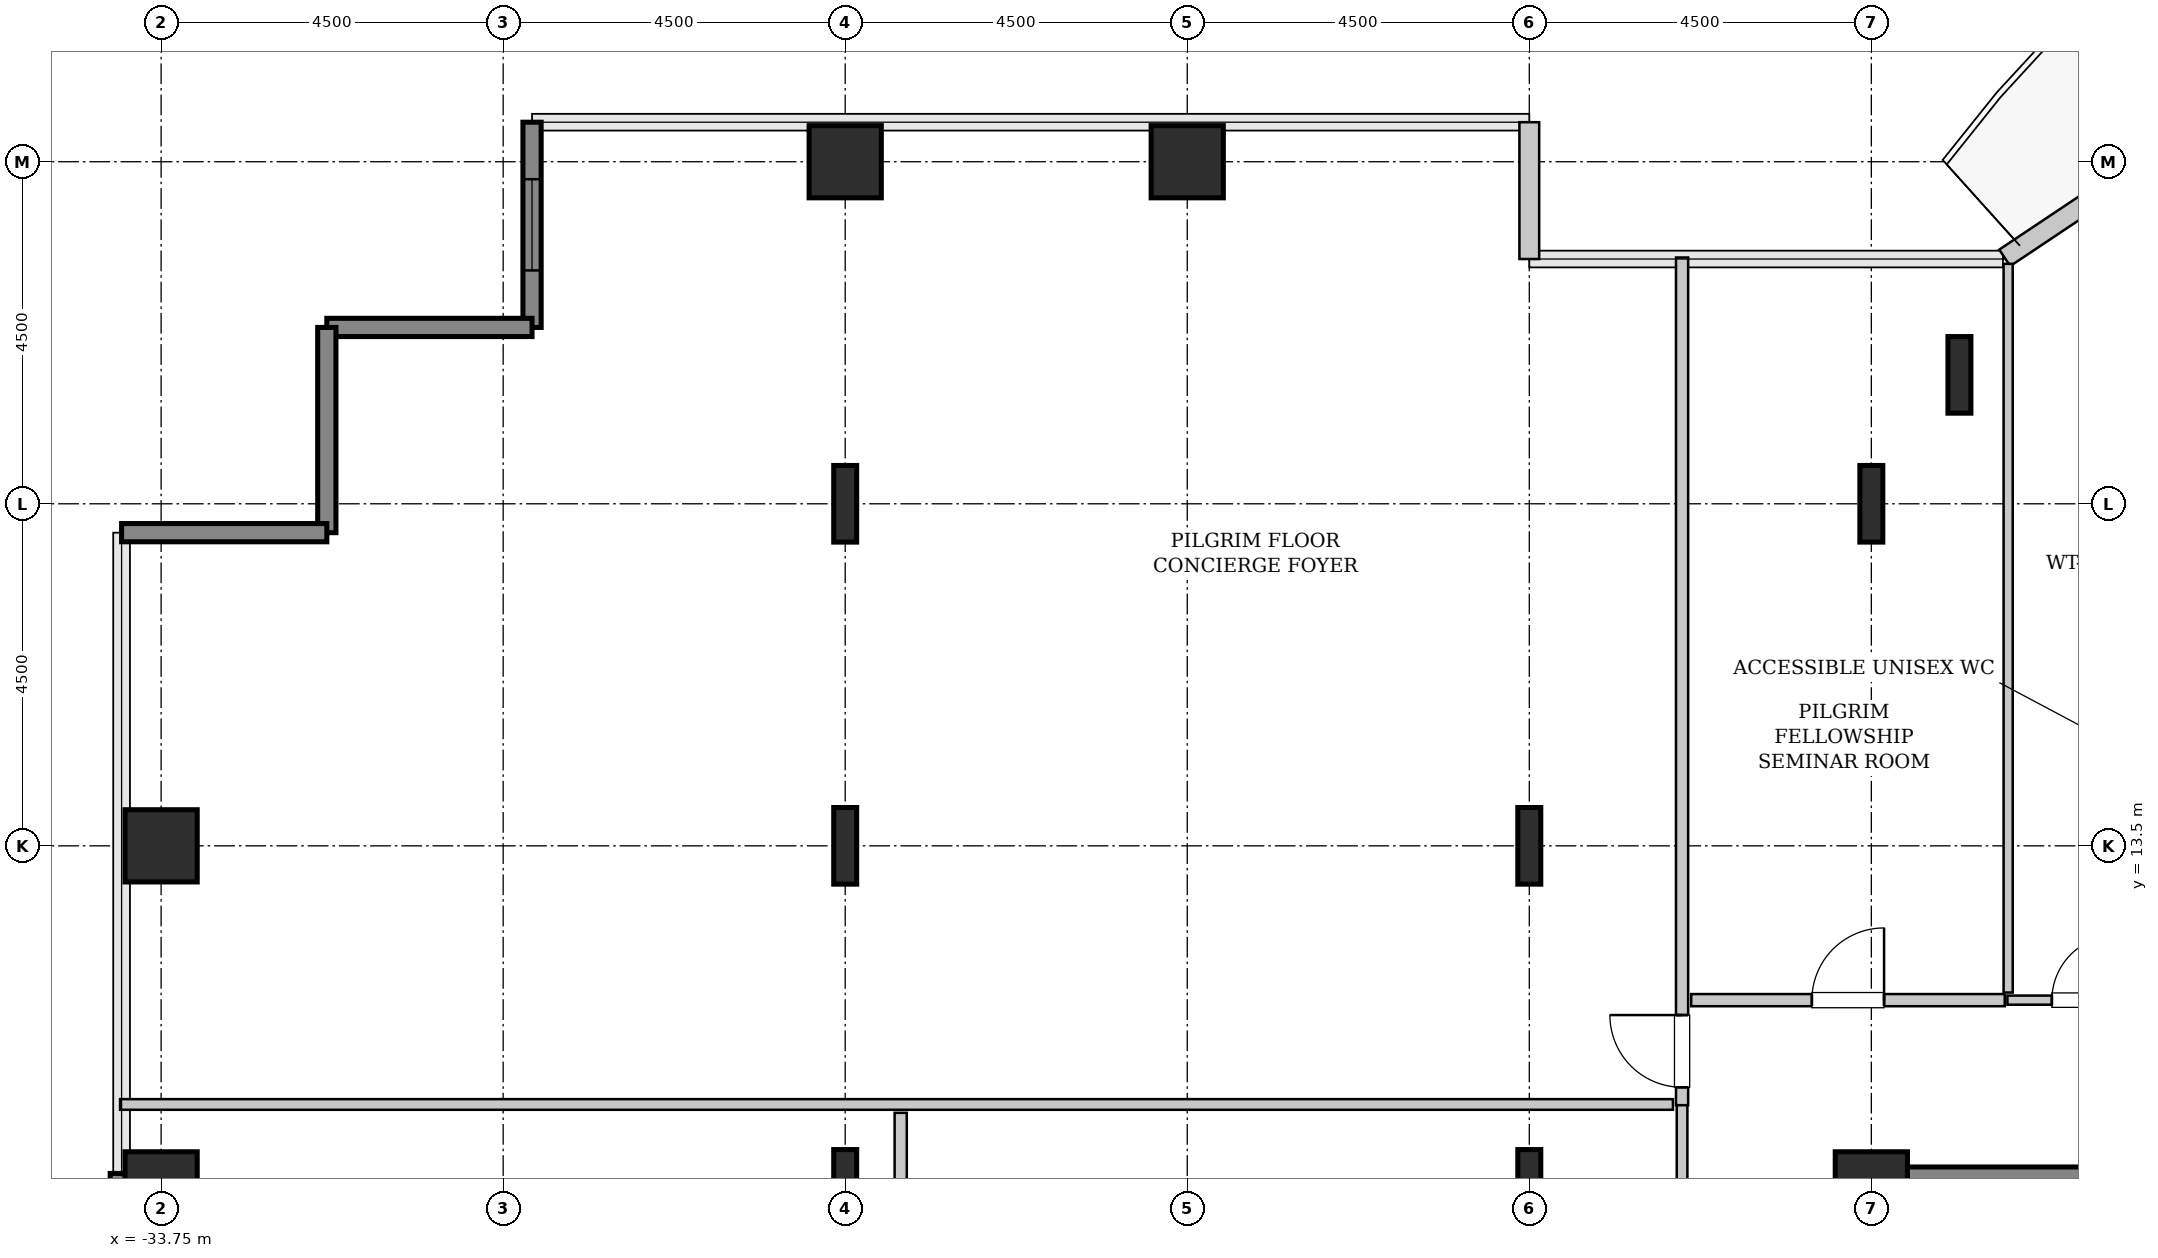
"""IFC4 building model, lengths in metres.
Left out: names, types, materials, properties, quantities, classifications, styles, units other than length and angle.
Written with IfcOpenShell. Run it as: python <this file> out.ifc"""

import sys

from ifc_helpers import new_model, si_unit, direction, frame, frame_2d, origin, origin_2d, place, context, subcontext, project, spatial, rectangle, hollow_rectangle, i_section, extrude, source, transform, mapped, element, fill, save


model = new_model("IFC4")
c1 = context("Model", 3, precision=1e-05, world=origin(), true_north=direction((0.0, 1.0)))
c2 = subcontext(c1, "Body", "Model", "MODEL_VIEW")
j1 = project(units=[si_unit("LENGTHUNIT", "METRE"), si_unit("PLANEANGLEUNIT", "RADIAN")], contexts=[c1])
p1 = place(None, origin())
s1 = spatial("IfcSite", under=j1, at=p1, CompositionType="ELEMENT")
p2 = place(p1, origin())
s2 = spatial("IfcBuilding", under=s1, at=p2, CompositionType="ELEMENT")
p3 = place(p2, frame((0.0, 0.0, 102.2)))
s3 = spatial("IfcBuildingStorey", under=s2, at=p3, CompositionType="ELEMENT", Elevation=102.2)
m1 = source(origin(), c2, "Body", "SweptSolid", [
    extrude(rectangle(XDim=9.975, YDim=0.55, at=frame_2d((4.987, 0.0))), origin(), (0.0, 0.0, 1.0), 3.8),
])
p4 = place(p3, frame((-11.525, 9.0, 0.0), z_axis=(0.0, 0.0, 1.0), x_axis=(1.0, 0.0, 0.0)))
e1 = element("IfcWall", 1, at=p4, inside=s3, PredefinedType="SHEAR", context=c2, shape_type="MappedRepresentation", body=[
    mapped(m1, transform((0.0, 0.0, 0.0), x_axis=(1.0, 0.0, 0.0), y_axis=(0.0, 1.0, 0.0), z_axis=(0.0, 0.0, 1.0), scale=1.0)),
])
m2 = source(origin(), c2, "Body", "SweptSolid", [
    extrude(hollow_rectangle(XDim=0.95, YDim=0.95, WallThickness=0.045, InnerFilletRadius=0.045, OuterFilletRadius=0.09, at=origin_2d()), origin(), (0.0, 0.0, 1.0), 3.8),
])
for number, where, z_axis, x_axis in (
    (2, (-33.75, 9.0, 0.0), (0.0, 0.0, 1.0), (1.0, 0.0, 0.0)),
    (3, (-33.75, 13.5, 0.0), (0.0, 0.0, 1.0), (1.0, 0.0, 0.0)),
):
    element("IfcColumn", number, at=place(p3, frame(where, z_axis=z_axis, x_axis=x_axis)), inside=s3, PredefinedType="COLUMN", context=c2, shape_type="MappedRepresentation", body=[
        mapped(m2, transform((0.0, 0.0, 0.0), x_axis=(1.0, 0.0, 0.0), y_axis=(0.0, 1.0, 0.0), z_axis=(0.0, 0.0, 1.0), scale=1.0)),
    ])
m3 = source(origin(), c2, "Body", "SweptSolid", [
    extrude(i_section(OverallWidth=0.302, OverallDepth=1.008, WebThickness=0.021, FlangeThickness=0.04, FilletRadius=0.03, at=origin_2d()), origin(), (0.0, 0.0, 1.0), 3.8),
])
for number, where, z_axis, x_axis in (
    (4, (-24.75, 9.0, 0.0), (0.0, 0.0, 1.0), (1.0, 0.0, 0.0)),
    (5, (-24.75, 13.5, 0.0), (0.0, 0.0, 1.0), (1.0, 0.0, 0.0)),
    (6, (-24.75, 18.0, 0.0), (0.0, 0.0, 1.0), (1.0, 0.0, 0.0)),
):
    element("IfcColumn", number, at=place(p3, frame(where, z_axis=z_axis, x_axis=x_axis)), inside=s3, PredefinedType="COLUMN", context=c2, shape_type="MappedRepresentation", body=[
        mapped(m3, transform((0.0, 0.0, 0.0), x_axis=(1.0, 0.0, 0.0), y_axis=(0.0, 1.0, 0.0), z_axis=(0.0, 0.0, 1.0), scale=1.0)),
    ])
for number, where, z_axis, x_axis in (
    (7, (-24.75, 22.5, 0.0), (0.0, 0.0, 1.0), (1.0, 0.0, 0.0)),
    (8, (-20.25, 22.5, 0.0), (0.0, 0.0, 1.0), (1.0, 0.0, 0.0)),
):
    element("IfcColumn", number, at=place(p3, frame(where, z_axis=z_axis, x_axis=x_axis)), inside=s3, PredefinedType="COLUMN", context=c2, shape_type="MappedRepresentation", body=[
        mapped(m2, transform((0.0, 0.0, 0.0), x_axis=(1.0, 0.0, 0.0), y_axis=(0.0, 1.0, 0.0), z_axis=(0.0, 0.0, 1.0), scale=1.0)),
    ])
for number, where, z_axis, x_axis in (
    (9, (-15.75, 9.0, 0.0), (0.0, 0.0, 1.0), (1.0, 0.0, 0.0)),
    (10, (-15.75, 13.5, 0.0), (0.0, 0.0, 1.0), (1.0, 0.0, 0.0)),
):
    element("IfcColumn", number, at=place(p3, frame(where, z_axis=z_axis, x_axis=x_axis)), inside=s3, PredefinedType="COLUMN", context=c2, shape_type="MappedRepresentation", body=[
        mapped(m3, transform((0.0, 0.0, 0.0), x_axis=(1.0, 0.0, 0.0), y_axis=(0.0, 1.0, 0.0), z_axis=(0.0, 0.0, 1.0), scale=1.0)),
    ])
m4 = source(origin(), c2, "Body", "SweptSolid", [
    extrude(hollow_rectangle(XDim=0.95, YDim=0.95, WallThickness=0.045, InnerFilletRadius=0.045, OuterFilletRadius=0.09, at=origin_2d()), origin(), (0.0, 0.0, 1.0), 3.8),
])
p5 = place(p3, frame((-11.25, 9.0, 0.0), z_axis=(0.0, 0.0, 1.0), x_axis=(1.0, 0.0, 0.0)))
e11 = element("IfcColumn", 11, at=p5, inside=s3, PredefinedType="COLUMN", context=c2, shape_type="MappedRepresentation", body=[
    mapped(m4, transform((0.0, 0.0, 0.0), x_axis=(1.0, 0.0, 0.0), y_axis=(0.0, 1.0, 0.0), z_axis=(0.0, 0.0, 1.0), scale=1.0)),
])
for number, where, z_axis, x_axis in (
    (12, (-11.25, 18.0, 0.0), (0.0, 0.0, 1.0), (1.0, 0.0, 0.0)),
    (13, (-10.091, 19.696, 0.0), (0.0, 0.0, 1.0), (1.0, 0.0, 0.0)),
):
    element("IfcColumn", number, at=place(p3, frame(where, z_axis=z_axis, x_axis=x_axis)), inside=s3, PredefinedType="COLUMN", context=c2, shape_type="MappedRepresentation", body=[
        mapped(m3, transform((0.0, 0.0, 0.0), x_axis=(1.0, 0.0, 0.0), y_axis=(0.0, 1.0, 0.0), z_axis=(0.0, 0.0, 1.0), scale=1.0)),
    ])
m5 = source(origin(), c2, "Body", "SweptSolid", [
    extrude(rectangle(XDim=4.88, YDim=0.3, at=frame_2d((2.44, 0.0))), origin(), (0.0, 0.0, 1.0), 3.55),
])
p6 = place(p3, frame((-34.27, 4.31, 0.0), z_axis=(0.0, 0.0, 1.0), x_axis=(0.0, 1.0, 0.0)))
e14 = element("IfcWall", 14, at=p6, inside=s3, PredefinedType="SHEAR", context=c2, shape_type="MappedRepresentation", body=[
    mapped(m5, transform((0.0, 0.0, 0.0), x_axis=(1.0, 0.0, 0.0), y_axis=(0.0, 1.0, 0.0), z_axis=(0.0, 0.0, 1.0), scale=1.0)),
])
m6 = source(origin(), c2, "Body", "SweptSolid", [
    extrude(rectangle(XDim=1.469, YDim=0.26, at=frame_2d((0.734, 0.0))), origin(), (0.0, 0.0, 1.0), 3.55),
])
p7 = place(p3, frame((-8.273, 22.052, 0.0), z_axis=(0.0, 0.0, 1.0), x_axis=(-0.831461760506, -0.555581983884, 0.0)))
e15 = element("IfcWall", 15, at=p7, inside=s3, PredefinedType="SOLIDWALL", context=c2, shape_type="MappedRepresentation", body=[
    mapped(m6, transform((0.0, 0.0, 0.0), x_axis=(1.0, 0.0, 0.0), y_axis=(0.0, 1.0, 0.0), z_axis=(0.0, 0.0, 1.0), scale=1.0)),
])
m7 = source(origin(), c2, "Body", "SweptSolid", [
    extrude(rectangle(XDim=1.8, YDim=0.26, at=frame_2d((0.9, 0.0))), origin(), (0.0, 0.0, 1.0), 3.55),
])
p8 = place(p3, frame((-15.75, 21.22, 0.0), z_axis=(0.0, 0.0, 1.0), x_axis=(0.0, 1.0, 0.0)))
e16 = element("IfcWall", 16, at=p8, inside=s3, PredefinedType="SOLIDWALL", context=c2, shape_type="MappedRepresentation", body=[
    mapped(m7, transform((0.0, 0.0, 0.0), x_axis=(1.0, 0.0, 0.0), y_axis=(0.0, 1.0, 0.0), z_axis=(0.0, 0.0, 1.0), scale=1.0)),
])
m8 = source(origin(), c2, "Body", "SweptSolid", [
    extrude(rectangle(XDim=2.7, YDim=0.24, at=frame_2d((1.35, 0.0))), origin(), (0.0, 0.0, 1.0), 3.55),
])
p9 = place(p3, frame((-28.87, 23.02, 0.0), z_axis=(0.0, 0.0, 1.0), x_axis=(0.0, -1.0, 0.0)))
e17 = element("IfcWall", 17, at=p9, inside=s3, PredefinedType="SHEAR", context=c2, shape_type="MappedRepresentation", body=[
    mapped(m8, transform((0.0, 0.0, 0.0), x_axis=(1.0, 0.0, 0.0), y_axis=(0.0, 1.0, 0.0), z_axis=(0.0, 0.0, 1.0), scale=1.0)),
])
p10 = place(p9, frame((0.75, 0.0, 0.85)))
e18 = element("IfcOpeningElement", 18, at=p10, cuts=e17, PredefinedType="OPENING", context=c2, shape_type="SweptSolid", body=[
    extrude(rectangle(XDim=1.2, YDim=1.8, at=frame_2d((0.6, 0.9))), frame((0.0, 0.13, 0.0), z_axis=(0.0, -1.0, 0.0), x_axis=(1.0, 0.0, 0.0)), (0.0, 0.0, 1.0), 0.26),
])
for number, where, z_axis, x_axis in (
    (19, (-28.87, 20.32, 0.0), (0.0, 0.0, 1.0), (-1.0, 0.0, 0.0)),
    (20, (-31.57, 20.32, 0.0), (0.0, 0.0, 1.0), (0.0, -1.0, 0.0)),
    (21, (-31.57, 17.62, 0.0), (0.0, 0.0, 1.0), (-1.0, 0.0, 0.0)),
):
    element("IfcWall", number, at=place(p3, frame(where, z_axis=z_axis, x_axis=x_axis)), inside=s3, PredefinedType="SHEAR", context=c2, shape_type="MappedRepresentation", body=[
        mapped(m8, transform((0.0, 0.0, 0.0), x_axis=(1.0, 0.0, 0.0), y_axis=(0.0, 1.0, 0.0), z_axis=(0.0, 0.0, 1.0), scale=1.0)),
    ])
m9 = source(origin(), c2, "Body", "SweptSolid", [
    extrude(rectangle(XDim=2.02, YDim=0.12, at=frame_2d((1.01, 0.0))), origin(), (0.0, 0.0, 1.0), 3.535),
])
p11 = place(p3, frame((-9.46, 11.47, 0.0), z_axis=(0.0, 0.0, 1.0), x_axis=(1.0, 0.0, 0.0)))
e22 = element("IfcWall", 22, at=p11, inside=s3, PredefinedType="PLUMBINGWALL", context=c2, shape_type="MappedRepresentation", body=[
    mapped(m9, transform((0.0, 0.0, 0.0), x_axis=(1.0, 0.0, 0.0), y_axis=(0.0, 1.0, 0.0), z_axis=(0.0, 0.0, 1.0), scale=1.0)),
])
p12 = place(p11, frame((0.585, 0.0, 0.0)))
e23 = element("IfcOpeningElement", 23, at=p12, cuts=e22, PredefinedType="OPENING", context=c2, shape_type="SweptSolid", body=[
    extrude(rectangle(XDim=0.85, YDim=2.1, at=frame_2d((0.425, 1.05))), frame((0.0, 0.07, 0.0), z_axis=(0.0, -1.0, 0.0), x_axis=(1.0, 0.0, 0.0)), (0.0, 0.0, 1.0), 0.14),
])
m10 = source(origin(), c2, "Body", "SweptSolid", [
    extrude(rectangle(XDim=9.587, YDim=0.12, at=frame_2d((4.793, 0.0))), origin(), (0.0, 0.0, 1.0), 3.535),
])
p13 = place(p3, frame((-9.45, 11.57, 0.0), z_axis=(0.0, 0.0, 1.0), x_axis=(0.0, 1.0, 0.0)))
e24 = element("IfcWall", 24, at=p13, inside=s3, PredefinedType="PLUMBINGWALL", context=c2, shape_type="MappedRepresentation", body=[
    mapped(m10, transform((0.0, 0.0, 0.0), x_axis=(1.0, 0.0, 0.0), y_axis=(0.0, 1.0, 0.0), z_axis=(0.0, 0.0, 1.0), scale=1.0)),
])
m11 = source(origin(), c2, "Body", "SweptSolid", [
    extrude(rectangle(XDim=11.153, YDim=0.16, at=frame_2d((5.576, 0.0))), origin(), (0.0, 0.0, 1.0), 3.535),
])
p14 = place(p3, frame((-13.74, 10.087, 0.0), z_axis=(0.0, 0.0, 1.0), x_axis=(0.0, 1.0, 0.0)))
e25 = element("IfcWall", 25, at=p14, inside=s3, PredefinedType="PARTITIONING", context=c2, shape_type="MappedRepresentation", body=[
    mapped(m11, transform((0.0, 0.0, 0.0), x_axis=(1.0, 0.0, 0.0), y_axis=(0.0, 1.0, 0.0), z_axis=(0.0, 0.0, 1.0), scale=1.0)),
])
p15 = place(p14, frame((0.236, 0.0, 0.0)))
e26 = element("IfcOpeningElement", 26, at=p15, cuts=e25, PredefinedType="OPENING", context=c2, shape_type="SweptSolid", body=[
    extrude(rectangle(XDim=0.95, YDim=2.1, at=frame_2d((0.475, 1.05))), frame((0.0, 0.09, 0.0), z_axis=(0.0, -1.0, 0.0), x_axis=(1.0, 0.0, 0.0)), (0.0, 0.0, 1.0), 0.18),
])
m12 = source(origin(), c2, "Body", "SweptSolid", [
    extrude(rectangle(XDim=20.43, YDim=0.14, at=frame_2d((10.215, 0.0))), origin(), (0.0, 0.0, 1.0), 3.535),
])
p16 = place(p3, frame((-34.29, 10.097, 0.0), z_axis=(0.0, 0.0, 1.0), x_axis=(1.0, 0.0, 0.0)))
e27 = element("IfcWall", 27, at=p16, inside=s3, PredefinedType="PARTITIONING", context=c2, shape_type="MappedRepresentation", body=[
    mapped(m12, transform((0.0, 0.0, 0.0), x_axis=(1.0, 0.0, 0.0), y_axis=(0.0, 1.0, 0.0), z_axis=(0.0, 0.0, 1.0), scale=1.0)),
])
m13 = source(origin(), c2, "Body", "SweptSolid", [
    extrude(rectangle(XDim=6.847, YDim=0.14, at=frame_2d((3.424, 0.0))), origin(), (0.0, 0.0, 1.0), 3.535),
])
p17 = place(p3, frame((-13.74, 3.24, 0.0), z_axis=(0.0, 0.0, 1.0), x_axis=(0.0, 1.0, 0.0)))
e28 = element("IfcWall", 28, at=p17, inside=s3, PredefinedType="PARTITIONING", context=c2, shape_type="MappedRepresentation", body=[
    mapped(m13, transform((0.0, 0.0, 0.0), x_axis=(1.0, 0.0, 0.0), y_axis=(0.0, 1.0, 0.0), z_axis=(0.0, 0.0, 1.0), scale=1.0)),
])
m14 = source(origin(), c2, "Body", "SweptSolid", [
    extrude(rectangle(XDim=12.683, YDim=0.16, at=frame_2d((6.341, 0.0))), origin(), (0.0, 0.0, 1.0), 3.535),
])
p18 = place(p3, frame((-24.02, -2.695, 0.0), z_axis=(0.0, 0.0, 1.0), x_axis=(0.0, 1.0, 0.0)))
e29 = element("IfcWall", 29, at=p18, inside=s3, PredefinedType="PARTITIONING", context=c2, shape_type="MappedRepresentation", body=[
    mapped(m14, transform((0.0, 0.0, 0.0), x_axis=(1.0, 0.0, 0.0), y_axis=(0.0, 1.0, 0.0), z_axis=(0.0, 0.0, 1.0), scale=1.0)),
])
p19 = place(p18, frame((4.47, 0.0, 0.0)))
e30 = element("IfcOpeningElement", 30, at=p19, cuts=e29, PredefinedType="OPENING", context=c2, shape_type="SweptSolid", body=[
    extrude(rectangle(XDim=0.95, YDim=2.1, at=frame_2d((0.475, 1.05))), frame((0.0, 0.09, 0.0), z_axis=(0.0, -1.0, 0.0), x_axis=(1.0, 0.0, 0.0)), (0.0, 0.0, 1.0), 0.18),
])
m15 = source(origin(), c2, "Body", "SweptSolid", [
    extrude(rectangle(XDim=4.125, YDim=0.16, at=frame_2d((2.062, 0.0))), origin(), (0.0, 0.0, 1.0), 3.535),
])
p20 = place(p3, frame((-13.62, 11.47, 0.0), z_axis=(0.0, 0.0, 1.0), x_axis=(1.0, 0.0, 0.0)))
e31 = element("IfcWall", 31, at=p20, inside=s3, PredefinedType="PARTITIONING", context=c2, shape_type="MappedRepresentation", body=[
    mapped(m15, transform((0.0, 0.0, 0.0), x_axis=(1.0, 0.0, 0.0), y_axis=(0.0, 1.0, 0.0), z_axis=(0.0, 0.0, 1.0), scale=1.0)),
])
p21 = place(p20, frame((1.587, 0.0, 0.0)))
e32 = element("IfcOpeningElement", 32, at=p21, cuts=e31, PredefinedType="OPENING", context=c2, shape_type="SweptSolid", body=[
    extrude(rectangle(XDim=0.95, YDim=2.1, at=frame_2d((0.475, 1.05))), frame((0.0, 0.09, 0.0), z_axis=(0.0, -1.0, 0.0), x_axis=(1.0, 0.0, 0.0)), (0.0, 0.0, 1.0), 0.18),
])
m16 = source(origin(), c2, "Body", "SweptSolid", [
    extrude(rectangle(XDim=1.2, YDim=1.8, at=frame_2d((0.6, 0.9))), frame((0.0, 0.03, 0.0), z_axis=(0.0, -1.0, 0.0), x_axis=(1.0, 0.0, 0.0)), (0.0, 0.0, 1.0), 0.06),
])
p22 = place(p10, origin())
e33 = element("IfcWindow", 33, at=p22, inside=s3, PartitioningType="SINGLE_PANEL", PredefinedType="WINDOW", context=c2, shape_type="MappedRepresentation", body=[
    mapped(m16, transform((0.0, 0.0, 0.0), x_axis=(1.0, 0.0, 0.0), y_axis=(0.0, 1.0, 0.0), z_axis=(0.0, 0.0, 1.0), scale=1.0)),
])
fill(e18, e33)
m17 = source(origin(), c2, "Body", "SweptSolid", [
    extrude(rectangle(XDim=0.85, YDim=2.1, at=frame_2d((0.425, 1.05))), frame((0.0, 0.025, 0.0), z_axis=(0.0, -1.0, 0.0), x_axis=(1.0, 0.0, 0.0)), (0.0, 0.0, 1.0), 0.05),
])
p23 = place(p12, origin())
e34 = element("IfcDoor", 34, at=p23, inside=s3, OperationType="SINGLE_SWING_RIGHT", PredefinedType="DOOR", context=c2, shape_type="MappedRepresentation", body=[
    mapped(m17, transform((0.0, 0.0, 0.0), x_axis=(1.0, 0.0, 0.0), y_axis=(0.0, 1.0, 0.0), z_axis=(0.0, 0.0, 1.0), scale=1.0)),
])
fill(e23, e34)
m18 = source(origin(), c2, "Body", "SweptSolid", [
    extrude(rectangle(XDim=0.95, YDim=2.1, at=frame_2d((0.475, 1.05))), frame((0.0, 0.025, 0.0), z_axis=(0.0, -1.0, 0.0), x_axis=(1.0, 0.0, 0.0)), (0.0, 0.0, 1.0), 0.05),
])
p24 = place(p15, origin())
e35 = element("IfcDoor", 35, at=p24, inside=s3, OperationType="SINGLE_SWING_RIGHT", PredefinedType="DOOR", context=c2, shape_type="MappedRepresentation", body=[
    mapped(m18, transform((0.0, 0.0, 0.0), x_axis=(1.0, 0.0, 0.0), y_axis=(0.0, 1.0, 0.0), z_axis=(0.0, 0.0, 1.0), scale=1.0)),
])
fill(e26, e35)
p25 = place(p21, origin())
e36 = element("IfcDoor", 36, at=p25, inside=s3, OperationType="SINGLE_SWING_RIGHT", PredefinedType="DOOR", context=c2, shape_type="MappedRepresentation", body=[
    mapped(m18, transform((0.0, 0.0, 0.0), x_axis=(1.0, 0.0, 0.0), y_axis=(0.0, 1.0, 0.0), z_axis=(0.0, 0.0, 1.0), scale=1.0)),
])
fill(e32, e36)
save(model, sys.argv[1])
